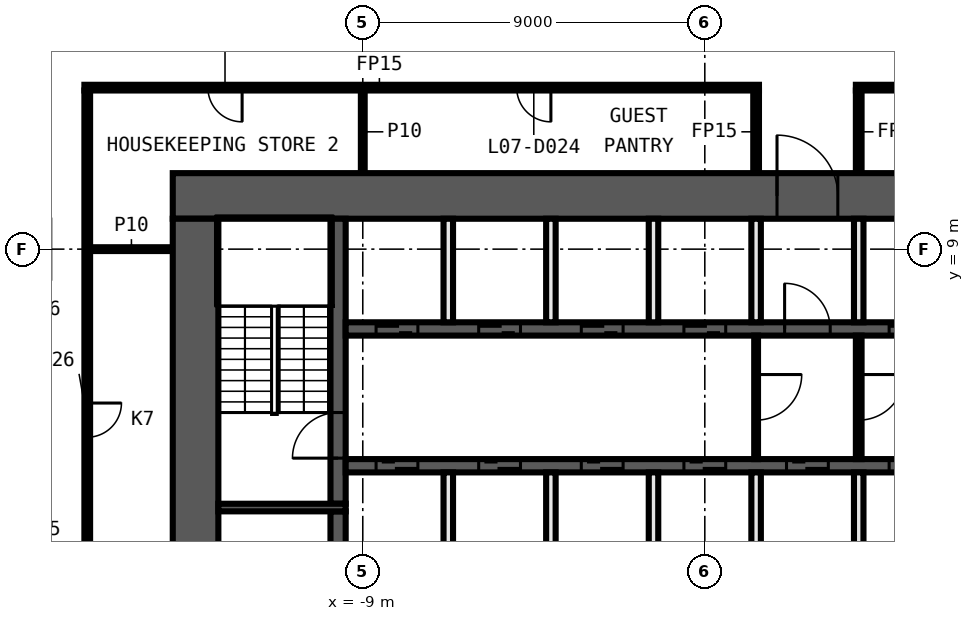
"""IFC4 building model, lengths in metres.
Left out: names, types, materials, properties, quantities, classifications, styles, units other than length and angle.
Written with IfcOpenShell. Run it as: python <this file> out.ifc"""

import sys

from ifc_helpers import new_model, si_unit, direction, frame, frame_2d, origin, place, context, subcontext, project, spatial, rectangle, extrude, element, fill, save


model = new_model("IFC4")
c1 = context("Model", 3, precision=1e-05, world=origin(), true_north=direction((0.0, 1.0)))
c2 = subcontext(c1, "Body", "Model", "MODEL_VIEW")
j1 = project(units=[si_unit("LENGTHUNIT", "METRE"), si_unit("PLANEANGLEUNIT", "RADIAN")], contexts=[c1])
p1 = place(None, origin())
s1 = spatial("IfcSite", under=j1, at=p1, CompositionType="ELEMENT")
p2 = place(p1, origin())
s2 = spatial("IfcBuilding", under=s1, at=p2, CompositionType="ELEMENT")
p3 = place(p2, frame((0.0, 0.0, 47.7)))
s3 = spatial("IfcBuildingStorey", under=s2, at=p3, CompositionType="ELEMENT", Elevation=47.7)
p4 = place(p3, frame((-16.175, 9.0, 0.0), z_axis=(0.0, 0.0, 1.0), x_axis=(1.0, 0.0, 0.0)))
e1 = element("IfcWall", 1, at=p4, inside=s3, PredefinedType="PARTITIONING", context=c2, shape_type="SweptSolid", body=[
    extrude(rectangle(XDim=2.175, YDim=0.1, at=frame_2d((1.087, 0.0))), origin(), (0.0, 0.0, 1.0), 3.3),
])
p5 = place(p3, frame((1.425, 13.25, 0.0), z_axis=(0.0, 0.0, 1.0), x_axis=(-1.0, 0.0, 0.0)))
e2 = element("IfcWall", 2, at=p5, inside=s3, PredefinedType="PARTITIONING", context=c2, shape_type="SweptSolid", body=[
    extrude(rectangle(XDim=17.75, YDim=0.15, at=frame_2d((8.875, 0.0))), origin(), (0.0, 0.0, 1.0), 3.3),
])
p6 = place(p5, frame((5.475, 0.0, 0.0)))
e3 = element("IfcOpeningElement", 3, at=p6, cuts=e2, PredefinedType="OPENING", context=c2, shape_type="SweptSolid", body=[
    extrude(rectangle(XDim=0.9, YDim=2.1, at=frame_2d((0.45, 1.05))), frame((0.0, 0.085, 0.0), z_axis=(0.0, -1.0, 0.0), x_axis=(1.0, 0.0, 0.0)), (0.0, 0.0, 1.0), 0.17),
])
p7 = place(p5, frame((13.6, 0.0, 0.0)))
e4 = element("IfcOpeningElement", 4, at=p7, cuts=e2, PredefinedType="OPENING", context=c2, shape_type="SweptSolid", body=[
    extrude(rectangle(XDim=0.9, YDim=2.1, at=frame_2d((0.45, 1.05))), frame((0.0, 0.085, 0.0), z_axis=(0.0, -1.0, 0.0), x_axis=(1.0, 0.0, 0.0)), (0.0, 0.0, 1.0), 0.17),
])
p8 = place(p3, frame((16.325, 13.25, 0.0), z_axis=(0.0, 0.0, 1.0), x_axis=(-1.0, 0.0, 0.0)))
e5 = element("IfcWall", 5, at=p8, inside=s3, PredefinedType="PARTITIONING", context=c2, shape_type="SweptSolid", body=[
    extrude(rectangle(XDim=12.35, YDim=0.15, at=frame_2d((6.175, 0.0))), origin(), (0.0, 0.0, 1.0), 3.3),
])
p9 = place(p8, frame((3.25, 0.0, 0.0)))
e6 = element("IfcOpeningElement", 6, at=p9, cuts=e5, PredefinedType="OPENING", context=c2, shape_type="SweptSolid", body=[
    extrude(rectangle(XDim=0.9, YDim=2.1, at=frame_2d((0.45, 1.05))), frame((0.0, 0.085, 0.0), z_axis=(0.0, -1.0, 0.0), x_axis=(1.0, 0.0, 0.0)), (0.0, 0.0, 1.0), 0.17),
])
for number, where, z_axis, x_axis in (
    (7, (4.05, 11.0, 0.0), (0.0, 0.0, 1.0), (0.0, 1.0, 0.0)),
    (8, (1.35, 11.0, 0.0), (0.0, 0.0, 1.0), (0.0, 1.0, 0.0)),
):
    element("IfcWall", number, at=place(p3, frame(where, z_axis=z_axis, x_axis=x_axis)), inside=s3, PredefinedType="PARTITIONING", context=c2, shape_type="SweptSolid", body=[
        extrude(rectangle(XDim=2.175, YDim=0.15, at=frame_2d((1.087, 0.0))), origin(), (0.0, 0.0, 1.0), 3.3),
    ])
p10 = place(p3, frame((-9.0, 11.0, 0.0), z_axis=(0.0, 0.0, 1.0), x_axis=(0.0, 1.0, 0.0)))
e9 = element("IfcWall", 9, at=p10, inside=s3, PredefinedType="PARTITIONING", context=c2, shape_type="SweptSolid", body=[
    extrude(rectangle(XDim=2.175, YDim=0.1, at=frame_2d((1.087, 0.0))), origin(), (0.0, 0.0, 1.0), 3.3),
])
p11 = place(p3, frame((-16.25, 13.175, 0.0), z_axis=(0.0, 0.0, 1.0), x_axis=(0.0, -1.0, 0.0)))
e10 = element("IfcWall", 10, at=p11, inside=s3, PredefinedType="PARTITIONING", context=c2, shape_type="SweptSolid", body=[
    extrude(rectangle(XDim=26.35, YDim=0.15, at=frame_2d((13.175, 0.0))), origin(), (0.0, 0.0, 1.0), 3.3),
])
p12 = place(p11, frame((17.225, 0.0, 0.0)))
e11 = element("IfcOpeningElement", 11, at=p12, cuts=e10, PredefinedType="OPENING", context=c2, shape_type="SweptSolid", body=[
    extrude(rectangle(XDim=0.9, YDim=2.1, at=frame_2d((0.45, 1.05))), frame((0.0, 0.085, 0.0), z_axis=(0.0, -1.0, 0.0), x_axis=(1.0, 0.0, 0.0)), (0.0, 0.0, 1.0), 0.17),
])
p13 = place(p11, frame((8.225, 0.0, 0.0)))
e12 = element("IfcOpeningElement", 12, at=p13, cuts=e10, PredefinedType="OPENING", context=c2, shape_type="SweptSolid", body=[
    extrude(rectangle(XDim=0.9, YDim=2.1, at=frame_2d((0.45, 1.05))), frame((0.0, 0.085, 0.0), z_axis=(0.0, -1.0, 0.0), x_axis=(1.0, 0.0, 0.0)), (0.0, 0.0, 1.0), 0.17),
])
p14 = place(p3, frame((-14.0, 10.4, 0.0), z_axis=(0.0, 0.0, 1.0), x_axis=(1.0, 0.0, 0.0)))
e13 = element("IfcWall", 13, at=p14, inside=s3, PredefinedType="SHEAR", context=c2, shape_type="SweptSolid", body=[
    extrude(rectangle(XDim=28.0, YDim=1.2, at=frame_2d((14.0, 0.0))), origin(), (0.0, 0.0, 1.0), 3.3),
])
p15 = place(p14, frame((15.9, 0.0, 0.0)))
e14 = element("IfcOpeningElement", 14, at=p15, cuts=e13, PredefinedType="OPENING", context=c2, shape_type="SweptSolid", body=[
    extrude(rectangle(XDim=1.6, YDim=2.1, at=frame_2d((0.8, 1.05))), frame((0.0, 0.61, 0.0), z_axis=(0.0, -1.0, 0.0), x_axis=(1.0, 0.0, 0.0)), (0.0, 0.0, 1.0), 1.22),
])
p16 = place(p3, frame((-13.4, -9.8, 0.0), z_axis=(0.0, 0.0, 1.0), x_axis=(0.0, 1.0, 0.0)))
e15 = element("IfcWall", 15, at=p16, inside=s3, PredefinedType="SHEAR", context=c2, shape_type="SweptSolid", body=[
    extrude(rectangle(XDim=19.6, YDim=1.2, at=frame_2d((9.8, 0.0))), origin(), (0.0, 0.0, 1.0), 3.3),
])
p17 = place(p3, frame((-9.65, -2.1, 0.0), z_axis=(0.0, 0.0, 1.0), x_axis=(0.0, 1.0, 0.0)))
e16 = element("IfcWall", 16, at=p17, inside=s3, PredefinedType="SHEAR", context=c2, shape_type="SweptSolid", body=[
    extrude(rectangle(XDim=4.2, YDim=0.4, at=frame_2d((2.1, 0.0))), origin(), (0.0, 0.0, 1.0), 3.3),
])
p18 = place(p3, frame((-9.65, 2.3, 0.0), z_axis=(0.0, 0.0, 1.0), x_axis=(0.0, 1.0, 0.0)))
e17 = element("IfcWall", 17, at=p18, inside=s3, PredefinedType="SHEAR", context=c2, shape_type="SweptSolid", body=[
    extrude(rectangle(XDim=7.5, YDim=0.4, at=frame_2d((3.75, 0.0))), origin(), (0.0, 0.0, 1.0), 3.3),
])
p19 = place(p18, frame((1.2, 0.0, 0.0)))
e18 = element("IfcOpeningElement", 18, at=p19, cuts=e17, PredefinedType="OPENING", context=c2, shape_type="SweptSolid", body=[
    extrude(rectangle(XDim=1.2, YDim=2.1, at=frame_2d((0.6, 1.05))), frame((0.0, 0.21, 0.0), z_axis=(0.0, -1.0, 0.0), x_axis=(1.0, 0.0, 0.0)), (0.0, 0.0, 1.0), 0.42),
])
p20 = place(p3, frame((-9.45, 2.2, 0.0), z_axis=(0.0, 0.0, 1.0), x_axis=(-1.0, 0.0, 0.0)))
e19 = element("IfcWall", 19, at=p20, inside=s3, PredefinedType="SHEAR", context=c2, shape_type="SweptSolid", body=[
    extrude(rectangle(XDim=3.35, YDim=0.2, at=frame_2d((1.675, 0.0))), origin(), (0.0, 0.0, 1.0), 3.3),
])
p21 = place(p3, frame((-9.45, 6.9, 0.0), z_axis=(0.0, 0.0, 1.0), x_axis=(1.0, 0.0, 0.0)))
e20 = element("IfcWall", 20, at=p21, inside=s3, PredefinedType="SHEAR", context=c2, shape_type="SweptSolid", body=[
    extrude(rectangle(XDim=18.9, YDim=0.35, at=frame_2d((9.45, 0.0))), origin(), (0.0, 0.0, 1.0), 3.3),
])
p22 = place(p21, frame((0.8, 0.0, 0.0)))
e21 = element("IfcOpeningElement", 21, at=p22, cuts=e20, PredefinedType="OPENING", context=c2, shape_type="SweptSolid", body=[
    extrude(rectangle(XDim=1.1, YDim=2.1, at=frame_2d((0.55, 1.05))), frame((0.0, 0.185, 0.0), z_axis=(0.0, -1.0, 0.0), x_axis=(1.0, 0.0, 0.0)), (0.0, 0.0, 1.0), 0.37),
])
p23 = place(p21, frame((3.5, 0.0, 0.0)))
e22 = element("IfcOpeningElement", 22, at=p23, cuts=e20, PredefinedType="OPENING", context=c2, shape_type="SweptSolid", body=[
    extrude(rectangle(XDim=1.1, YDim=2.1, at=frame_2d((0.55, 1.05))), frame((0.0, 0.185, 0.0), z_axis=(0.0, -1.0, 0.0), x_axis=(1.0, 0.0, 0.0)), (0.0, 0.0, 1.0), 0.37),
])
p24 = place(p21, frame((6.2, 0.0, 0.0)))
e23 = element("IfcOpeningElement", 23, at=p24, cuts=e20, PredefinedType="OPENING", context=c2, shape_type="SweptSolid", body=[
    extrude(rectangle(XDim=1.1, YDim=2.1, at=frame_2d((0.55, 1.05))), frame((0.0, 0.185, 0.0), z_axis=(0.0, -1.0, 0.0), x_axis=(1.0, 0.0, 0.0)), (0.0, 0.0, 1.0), 0.37),
])
p25 = place(p21, frame((8.9, 0.0, 0.0)))
e24 = element("IfcOpeningElement", 24, at=p25, cuts=e20, PredefinedType="OPENING", context=c2, shape_type="SweptSolid", body=[
    extrude(rectangle(XDim=1.1, YDim=2.1, at=frame_2d((0.55, 1.05))), frame((0.0, 0.185, 0.0), z_axis=(0.0, -1.0, 0.0), x_axis=(1.0, 0.0, 0.0)), (0.0, 0.0, 1.0), 0.37),
])
p26 = place(p21, frame((11.55, 0.0, 0.0)))
e25 = element("IfcOpeningElement", 25, at=p26, cuts=e20, PredefinedType="OPENING", context=c2, shape_type="SweptSolid", body=[
    extrude(rectangle(XDim=1.2, YDim=2.1, at=frame_2d((0.6, 1.05))), frame((0.0, 0.185, 0.0), z_axis=(0.0, -1.0, 0.0), x_axis=(1.0, 0.0, 0.0)), (0.0, 0.0, 1.0), 0.37),
])
p27 = place(p21, frame((14.3, 0.0, 0.0)))
e26 = element("IfcOpeningElement", 26, at=p27, cuts=e20, PredefinedType="OPENING", context=c2, shape_type="SweptSolid", body=[
    extrude(rectangle(XDim=1.1, YDim=2.1, at=frame_2d((0.55, 1.05))), frame((0.0, 0.185, 0.0), z_axis=(0.0, -1.0, 0.0), x_axis=(1.0, 0.0, 0.0)), (0.0, 0.0, 1.0), 0.37),
])
p28 = place(p21, frame((17.0, 0.0, 0.0)))
e27 = element("IfcOpeningElement", 27, at=p28, cuts=e20, PredefinedType="OPENING", context=c2, shape_type="SweptSolid", body=[
    extrude(rectangle(XDim=1.1, YDim=2.1, at=frame_2d((0.55, 1.05))), frame((0.0, 0.185, 0.0), z_axis=(0.0, -1.0, 0.0), x_axis=(1.0, 0.0, 0.0)), (0.0, 0.0, 1.0), 0.37),
])
p29 = place(p3, frame((9.45, 3.3, 0.0), z_axis=(0.0, 0.0, 1.0), x_axis=(-1.0, 0.0, 0.0)))
e28 = element("IfcWall", 28, at=p29, inside=s3, PredefinedType="SHEAR", context=c2, shape_type="SweptSolid", body=[
    extrude(rectangle(XDim=18.9, YDim=0.35, at=frame_2d((9.45, 0.0))), origin(), (0.0, 0.0, 1.0), 3.3),
])
p30 = place(p29, frame((17.0, 0.0, 0.0)))
e29 = element("IfcOpeningElement", 29, at=p30, cuts=e28, PredefinedType="OPENING", context=c2, shape_type="SweptSolid", body=[
    extrude(rectangle(XDim=1.1, YDim=2.1, at=frame_2d((0.55, 1.05))), frame((0.0, 0.185, 0.0), z_axis=(0.0, -1.0, 0.0), x_axis=(1.0, 0.0, 0.0)), (0.0, 0.0, 1.0), 0.37),
])
p31 = place(p29, frame((14.3, 0.0, 0.0)))
e30 = element("IfcOpeningElement", 30, at=p31, cuts=e28, PredefinedType="OPENING", context=c2, shape_type="SweptSolid", body=[
    extrude(rectangle(XDim=1.1, YDim=2.1, at=frame_2d((0.55, 1.05))), frame((0.0, 0.185, 0.0), z_axis=(0.0, -1.0, 0.0), x_axis=(1.0, 0.0, 0.0)), (0.0, 0.0, 1.0), 0.37),
])
p32 = place(p29, frame((11.6, 0.0, 0.0)))
e31 = element("IfcOpeningElement", 31, at=p32, cuts=e28, PredefinedType="OPENING", context=c2, shape_type="SweptSolid", body=[
    extrude(rectangle(XDim=1.1, YDim=2.1, at=frame_2d((0.55, 1.05))), frame((0.0, 0.185, 0.0), z_axis=(0.0, -1.0, 0.0), x_axis=(1.0, 0.0, 0.0)), (0.0, 0.0, 1.0), 0.37),
])
p33 = place(p29, frame((8.9, 0.0, 0.0)))
e32 = element("IfcOpeningElement", 32, at=p33, cuts=e28, PredefinedType="OPENING", context=c2, shape_type="SweptSolid", body=[
    extrude(rectangle(XDim=1.1, YDim=2.1, at=frame_2d((0.55, 1.05))), frame((0.0, 0.185, 0.0), z_axis=(0.0, -1.0, 0.0), x_axis=(1.0, 0.0, 0.0)), (0.0, 0.0, 1.0), 0.37),
])
p34 = place(p29, frame((6.2, 0.0, 0.0)))
e33 = element("IfcOpeningElement", 33, at=p34, cuts=e28, PredefinedType="OPENING", context=c2, shape_type="SweptSolid", body=[
    extrude(rectangle(XDim=1.1, YDim=2.1, at=frame_2d((0.55, 1.05))), frame((0.0, 0.185, 0.0), z_axis=(0.0, -1.0, 0.0), x_axis=(1.0, 0.0, 0.0)), (0.0, 0.0, 1.0), 0.37),
])
p35 = place(p29, frame((3.5, 0.0, 0.0)))
e34 = element("IfcOpeningElement", 34, at=p35, cuts=e28, PredefinedType="OPENING", context=c2, shape_type="SweptSolid", body=[
    extrude(rectangle(XDim=1.1, YDim=2.1, at=frame_2d((0.55, 1.05))), frame((0.0, 0.185, 0.0), z_axis=(0.0, -1.0, 0.0), x_axis=(1.0, 0.0, 0.0)), (0.0, 0.0, 1.0), 0.37),
])
p36 = place(p29, frame((0.9, 0.0, 0.0)))
e35 = element("IfcOpeningElement", 35, at=p36, cuts=e28, PredefinedType="OPENING", context=c2, shape_type="SweptSolid", body=[
    extrude(rectangle(XDim=0.9, YDim=2.1, at=frame_2d((0.45, 1.05))), frame((0.0, 0.185, 0.0), z_axis=(0.0, -1.0, 0.0), x_axis=(1.0, 0.0, 0.0)), (0.0, 0.0, 1.0), 0.37),
])
p37 = place(p3, frame((4.05, 6.725, 0.0), z_axis=(0.0, 0.0, 1.0), x_axis=(0.0, -1.0, 0.0)))
e36 = element("IfcWall", 36, at=p37, inside=s3, PredefinedType="PARTITIONING", context=c2, shape_type="SweptSolid", body=[
    extrude(rectangle(XDim=3.25, YDim=0.15, at=frame_2d((1.625, 0.0))), origin(), (0.0, 0.0, 1.0), 3.3),
])
p38 = place(p37, frame((1.025, 0.0, 0.0)))
e37 = element("IfcOpeningElement", 37, at=p38, cuts=e36, PredefinedType="OPENING", context=c2, shape_type="SweptSolid", body=[
    extrude(rectangle(XDim=1.2, YDim=2.1, at=frame_2d((0.6, 1.05))), frame((0.0, 0.085, 0.0), z_axis=(0.0, -1.0, 0.0), x_axis=(1.0, 0.0, 0.0)), (0.0, 0.0, 1.0), 0.17),
])
for number, where, z_axis, x_axis in (
    (38, (4.05, 0.4, 0.0), (0.0, 0.0, 1.0), (0.0, 1.0, 0.0)),
    (39, (4.05, 7.075, 0.0), (0.0, 0.0, 1.0), (0.0, 1.0, 0.0)),
):
    element("IfcWall", number, at=place(p3, frame(where, z_axis=z_axis, x_axis=x_axis)), inside=s3, PredefinedType="SOLIDWALL", context=c2, shape_type="SweptSolid", body=[
        extrude(rectangle(XDim=2.725, YDim=0.25, at=frame_2d((1.363, 0.0))), origin(), (0.0, 0.0, 1.0), 3.3),
    ])
p39 = place(p3, frame((1.35, 6.725, 0.0), z_axis=(0.0, 0.0, 1.0), x_axis=(0.0, -1.0, 0.0)))
e40 = element("IfcWall", 40, at=p39, inside=s3, PredefinedType="PARTITIONING", context=c2, shape_type="SweptSolid", body=[
    extrude(rectangle(XDim=3.25, YDim=0.1, at=frame_2d((1.625, 0.0))), origin(), (0.0, 0.0, 1.0), 3.3),
])
p40 = place(p39, frame((1.025, 0.0, 0.0)))
e41 = element("IfcOpeningElement", 41, at=p40, cuts=e40, PredefinedType="OPENING", context=c2, shape_type="SweptSolid", body=[
    extrude(rectangle(XDim=1.2, YDim=2.1, at=frame_2d((0.6, 1.05))), frame((0.0, 0.06, 0.0), z_axis=(0.0, -1.0, 0.0), x_axis=(1.0, 0.0, 0.0)), (0.0, 0.0, 1.0), 0.12),
])
for number, where, z_axis, x_axis in (
    (42, (1.35, 0.4, 0.0), (0.0, 0.0, 1.0), (0.0, 1.0, 0.0)),
    (43, (1.35, 7.075, 0.0), (0.0, 0.0, 1.0), (0.0, 1.0, 0.0)),
    (44, (-1.35, 0.4, 0.0), (0.0, 0.0, 1.0), (0.0, 1.0, 0.0)),
    (45, (-1.35, 7.075, 0.0), (0.0, 0.0, 1.0), (0.0, 1.0, 0.0)),
    (46, (-4.05, 0.4, 0.0), (0.0, 0.0, 1.0), (0.0, 1.0, 0.0)),
    (47, (-4.05, 7.075, 0.0), (0.0, 0.0, 1.0), (0.0, 1.0, 0.0)),
    (48, (-6.75, 0.4, 0.0), (0.0, 0.0, 1.0), (0.0, 1.0, 0.0)),
    (49, (-6.75, 7.075, 0.0), (0.0, 0.0, 1.0), (0.0, 1.0, 0.0)),
):
    element("IfcWall", number, at=place(p3, frame(where, z_axis=z_axis, x_axis=x_axis)), inside=s3, PredefinedType="SOLIDWALL", context=c2, shape_type="SweptSolid", body=[
        extrude(rectangle(XDim=2.725, YDim=0.25, at=frame_2d((1.363, 0.0))), origin(), (0.0, 0.0, 1.0), 3.3),
    ])
p41 = place(p6, origin())
e50 = element("IfcDoor", 50, at=p41, inside=s3, OperationType="SINGLE_SWING_RIGHT", PredefinedType="DOOR", context=c2, shape_type="SweptSolid", body=[
    extrude(rectangle(XDim=0.9, YDim=2.1, at=frame_2d((0.45, 1.05))), frame((0.0, 0.025, 0.0), z_axis=(0.0, -1.0, 0.0), x_axis=(1.0, 0.0, 0.0)), (0.0, 0.0, 1.0), 0.05),
])
fill(e3, e50)
p42 = place(p7, origin())
e51 = element("IfcDoor", 51, at=p42, inside=s3, OperationType="SINGLE_SWING_LEFT", PredefinedType="DOOR", context=c2, shape_type="SweptSolid", body=[
    extrude(rectangle(XDim=0.9, YDim=2.1, at=frame_2d((0.45, 1.05))), frame((0.0, 0.025, 0.0), z_axis=(0.0, -1.0, 0.0), x_axis=(1.0, 0.0, 0.0)), (0.0, 0.0, 1.0), 0.05),
])
fill(e4, e51)
p43 = place(p13, origin())
e52 = element("IfcDoor", 52, at=p43, inside=s3, OperationType="SINGLE_SWING_RIGHT", PredefinedType="DOOR", context=c2, shape_type="SweptSolid", body=[
    extrude(rectangle(XDim=0.9, YDim=2.1, at=frame_2d((0.45, 1.05))), frame((0.0, 0.025, 0.0), z_axis=(0.0, -1.0, 0.0), x_axis=(1.0, 0.0, 0.0)), (0.0, 0.0, 1.0), 0.05),
])
fill(e12, e52)
p44 = place(p22, origin())
e53 = element("IfcDoor", 53, at=p44, inside=s3, OperationType="DOUBLE_DOOR_SLIDING", PredefinedType="DOOR", context=c2, shape_type="SweptSolid", body=[
    extrude(rectangle(XDim=1.1, YDim=2.1, at=frame_2d((0.55, 1.05))), frame((0.0, 0.025, 0.0), z_axis=(0.0, -1.0, 0.0), x_axis=(1.0, 0.0, 0.0)), (0.0, 0.0, 1.0), 0.05),
])
fill(e21, e53)
p45 = place(p23, origin())
e54 = element("IfcDoor", 54, at=p45, inside=s3, OperationType="DOUBLE_DOOR_SLIDING", PredefinedType="DOOR", context=c2, shape_type="SweptSolid", body=[
    extrude(rectangle(XDim=1.1, YDim=2.1, at=frame_2d((0.55, 1.05))), frame((0.0, 0.025, 0.0), z_axis=(0.0, -1.0, 0.0), x_axis=(1.0, 0.0, 0.0)), (0.0, 0.0, 1.0), 0.05),
])
fill(e22, e54)
p46 = place(p24, origin())
e55 = element("IfcDoor", 55, at=p46, inside=s3, OperationType="DOUBLE_DOOR_SLIDING", PredefinedType="DOOR", context=c2, shape_type="SweptSolid", body=[
    extrude(rectangle(XDim=1.1, YDim=2.1, at=frame_2d((0.55, 1.05))), frame((0.0, 0.025, 0.0), z_axis=(0.0, -1.0, 0.0), x_axis=(1.0, 0.0, 0.0)), (0.0, 0.0, 1.0), 0.05),
])
fill(e23, e55)
p47 = place(p25, origin())
e56 = element("IfcDoor", 56, at=p47, inside=s3, OperationType="DOUBLE_DOOR_SLIDING", PredefinedType="DOOR", context=c2, shape_type="SweptSolid", body=[
    extrude(rectangle(XDim=1.1, YDim=2.1, at=frame_2d((0.55, 1.05))), frame((0.0, 0.025, 0.0), z_axis=(0.0, -1.0, 0.0), x_axis=(1.0, 0.0, 0.0)), (0.0, 0.0, 1.0), 0.05),
])
fill(e24, e56)
p48 = place(p15, origin())
e57 = element("IfcDoor", 57, at=p48, inside=s3, OperationType="DOUBLE_DOOR_SINGLE_SWING", PredefinedType="DOOR", context=c2, shape_type="SweptSolid", body=[
    extrude(rectangle(XDim=1.6, YDim=2.1, at=frame_2d((0.8, 1.05))), frame((0.0, 0.025, 0.0), z_axis=(0.0, -1.0, 0.0), x_axis=(1.0, 0.0, 0.0)), (0.0, 0.0, 1.0), 0.05),
])
fill(e14, e57)
p49 = place(p26, origin())
e58 = element("IfcDoor", 58, at=p49, inside=s3, OperationType="SINGLE_SWING_LEFT", PredefinedType="DOOR", context=c2, shape_type="SweptSolid", body=[
    extrude(rectangle(XDim=1.2, YDim=2.1, at=frame_2d((0.6, 1.05))), frame((0.0, 0.025, 0.0), z_axis=(0.0, -1.0, 0.0), x_axis=(1.0, 0.0, 0.0)), (0.0, 0.0, 1.0), 0.05),
])
fill(e25, e58)
p50 = place(p27, origin())
e59 = element("IfcDoor", 59, at=p50, inside=s3, OperationType="DOUBLE_DOOR_SLIDING", PredefinedType="DOOR", context=c2, shape_type="SweptSolid", body=[
    extrude(rectangle(XDim=1.1, YDim=2.1, at=frame_2d((0.55, 1.05))), frame((0.0, 0.025, 0.0), z_axis=(0.0, -1.0, 0.0), x_axis=(1.0, 0.0, 0.0)), (0.0, 0.0, 1.0), 0.05),
])
fill(e26, e59)
p51 = place(p30, origin())
e60 = element("IfcDoor", 60, at=p51, inside=s3, OperationType="DOUBLE_DOOR_SLIDING", PredefinedType="DOOR", context=c2, shape_type="SweptSolid", body=[
    extrude(rectangle(XDim=1.1, YDim=2.1, at=frame_2d((0.55, 1.05))), frame((0.0, 0.025, 0.0), z_axis=(0.0, -1.0, 0.0), x_axis=(1.0, 0.0, 0.0)), (0.0, 0.0, 1.0), 0.05),
])
fill(e29, e60)
p52 = place(p31, origin())
e61 = element("IfcDoor", 61, at=p52, inside=s3, OperationType="DOUBLE_DOOR_SLIDING", PredefinedType="DOOR", context=c2, shape_type="SweptSolid", body=[
    extrude(rectangle(XDim=1.1, YDim=2.1, at=frame_2d((0.55, 1.05))), frame((0.0, 0.025, 0.0), z_axis=(0.0, -1.0, 0.0), x_axis=(1.0, 0.0, 0.0)), (0.0, 0.0, 1.0), 0.05),
])
fill(e30, e61)
p53 = place(p32, origin())
e62 = element("IfcDoor", 62, at=p53, inside=s3, OperationType="DOUBLE_DOOR_SLIDING", PredefinedType="DOOR", context=c2, shape_type="SweptSolid", body=[
    extrude(rectangle(XDim=1.1, YDim=2.1, at=frame_2d((0.55, 1.05))), frame((0.0, 0.025, 0.0), z_axis=(0.0, -1.0, 0.0), x_axis=(1.0, 0.0, 0.0)), (0.0, 0.0, 1.0), 0.05),
])
fill(e31, e62)
p54 = place(p33, origin())
e63 = element("IfcDoor", 63, at=p54, inside=s3, OperationType="DOUBLE_DOOR_SLIDING", PredefinedType="DOOR", context=c2, shape_type="SweptSolid", body=[
    extrude(rectangle(XDim=1.1, YDim=2.1, at=frame_2d((0.55, 1.05))), frame((0.0, 0.025, 0.0), z_axis=(0.0, -1.0, 0.0), x_axis=(1.0, 0.0, 0.0)), (0.0, 0.0, 1.0), 0.05),
])
fill(e32, e63)
p55 = place(p34, origin())
e64 = element("IfcDoor", 64, at=p55, inside=s3, OperationType="DOUBLE_DOOR_SLIDING", PredefinedType="DOOR", context=c2, shape_type="SweptSolid", body=[
    extrude(rectangle(XDim=1.1, YDim=2.1, at=frame_2d((0.55, 1.05))), frame((0.0, 0.025, 0.0), z_axis=(0.0, -1.0, 0.0), x_axis=(1.0, 0.0, 0.0)), (0.0, 0.0, 1.0), 0.05),
])
fill(e33, e64)
p56 = place(p35, origin())
e65 = element("IfcDoor", 65, at=p56, inside=s3, OperationType="DOUBLE_DOOR_SLIDING", PredefinedType="DOOR", context=c2, shape_type="SweptSolid", body=[
    extrude(rectangle(XDim=1.1, YDim=2.1, at=frame_2d((0.55, 1.05))), frame((0.0, 0.025, 0.0), z_axis=(0.0, -1.0, 0.0), x_axis=(1.0, 0.0, 0.0)), (0.0, 0.0, 1.0), 0.05),
])
fill(e34, e65)
p57 = place(p19, origin())
e66 = element("IfcDoor", 66, at=p57, inside=s3, OperationType="SINGLE_SWING_RIGHT", PredefinedType="DOOR", context=c2, shape_type="SweptSolid", body=[
    extrude(rectangle(XDim=1.2, YDim=2.1, at=frame_2d((0.6, 1.05))), frame((0.0, 0.025, 0.0), z_axis=(0.0, -1.0, 0.0), x_axis=(1.0, 0.0, 0.0)), (0.0, 0.0, 1.0), 0.05),
])
fill(e18, e66)
p58 = place(p40, origin())
e67 = element("IfcDoor", 67, at=p58, inside=s3, OperationType="SINGLE_SWING_LEFT", PredefinedType="DOOR", context=c2, shape_type="SweptSolid", body=[
    extrude(rectangle(XDim=1.2, YDim=2.1, at=frame_2d((0.6, 1.05))), frame((0.0, 0.025, 0.0), z_axis=(0.0, -1.0, 0.0), x_axis=(1.0, 0.0, 0.0)), (0.0, 0.0, 1.0), 0.05),
])
fill(e41, e67)
p59 = place(p38, origin())
e68 = element("IfcDoor", 68, at=p59, inside=s3, OperationType="SINGLE_SWING_RIGHT", PredefinedType="DOOR", context=c2, shape_type="SweptSolid", body=[
    extrude(rectangle(XDim=1.2, YDim=2.1, at=frame_2d((0.6, 1.05))), frame((0.0, 0.025, 0.0), z_axis=(0.0, -1.0, 0.0), x_axis=(1.0, 0.0, 0.0)), (0.0, 0.0, 1.0), 0.05),
])
fill(e37, e68)
save(model, sys.argv[1])
